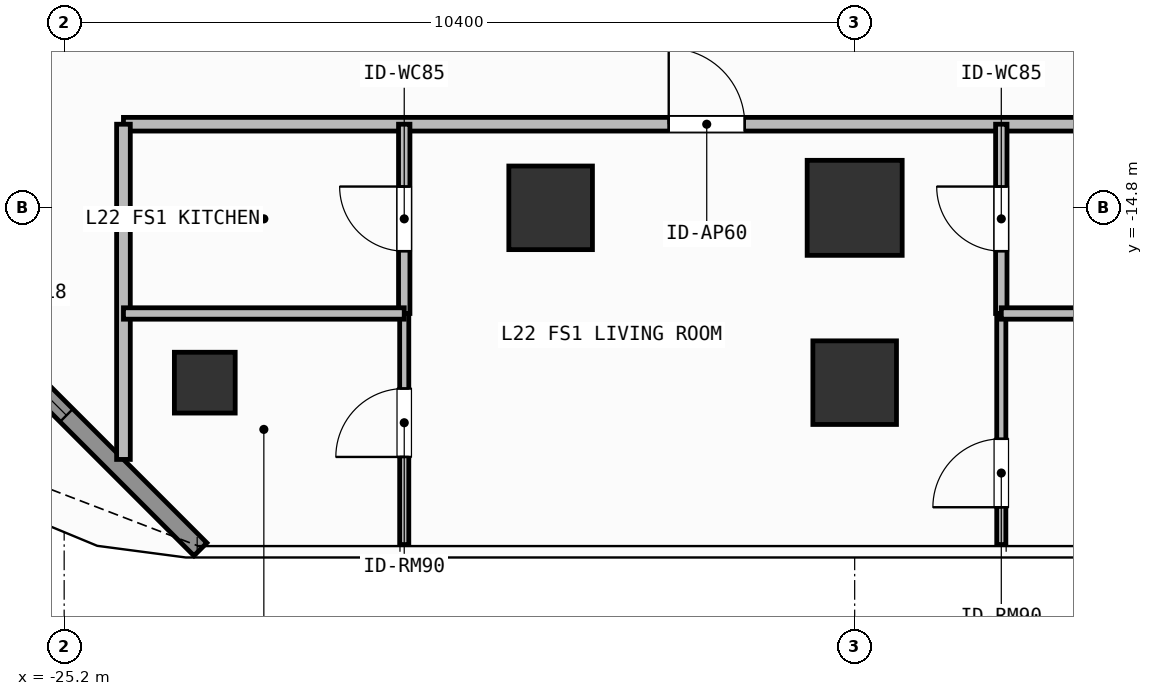
"""IFC4 building model, lengths in metres.
Left out: names, types, materials, properties, quantities, classifications, styles, units other than length and angle.
Written with IfcOpenShell. Run it as: python <this file> out.ifc"""

import sys

from ifc_helpers import new_model, si_unit, direction, frame, frame_2d, origin, origin_2d, place, context, subcontext, project, spatial, rectangle, hollow_rectangle, extrude, element, fill, save


model = new_model("IFC4")
c1 = context("Model", 3, precision=1e-05, world=origin(), true_north=direction((0.0, 1.0)))
c2 = subcontext(c1, "Body", "Model", "MODEL_VIEW")
j1 = project(units=[si_unit("LENGTHUNIT", "METRE"), si_unit("PLANEANGLEUNIT", "RADIAN")], contexts=[c1])
p1 = place(None, origin())
s1 = spatial("IfcSite", under=j1, at=p1, CompositionType="ELEMENT")
p2 = place(p1, origin())
s2 = spatial("IfcBuilding", under=s1, at=p2, CompositionType="ELEMENT")
p3 = place(p2, frame((0.0, 0.0, 89.1)))
s3 = spatial("IfcBuildingStorey", under=s2, at=p3, CompositionType="ELEMENT", Elevation=89.1)
p4 = place(p3, frame((-14.8, -14.8, 0.0), z_axis=(0.0, 0.0, 1.0), x_axis=(1.0, 0.0, 0.0)))
e1 = element("IfcColumn", 1, at=p4, inside=s3, PredefinedType="COLUMN", context=c2, shape_type="SweptSolid", body=[
    extrude(rectangle(XDim=1.25, YDim=1.25, at=origin_2d()), origin(), (0.0, 0.0, 1.0), 3.9),
])
for number, where, z_axis, x_axis in (
    (2, (-18.8, -14.8, 0.0), (0.0, 0.0, 1.0), (1.0, 0.0, 0.0)),
    (3, (-14.8, -17.1, 0.0), (0.0, 0.0, 1.0), (1.0, 0.0, 0.0)),
):
    element("IfcColumn", number, at=place(p3, frame(where, z_axis=z_axis, x_axis=x_axis)), inside=s3, PredefinedType="COLUMN", context=c2, shape_type="SweptSolid", body=[
        extrude(rectangle(XDim=1.1, YDim=1.1, at=origin_2d()), origin(), (0.0, 0.0, 1.0), 3.9),
    ])
p5 = place(p3, frame((-23.35, -17.1, 0.0), z_axis=(0.0, 0.0, 1.0), x_axis=(1.0, 0.0, 0.0)))
e4 = element("IfcColumn", 4, at=p5, inside=s3, PredefinedType="COLUMN", context=c2, shape_type="SweptSolid", body=[
    extrude(hollow_rectangle(XDim=0.8, YDim=0.8, WallThickness=0.036, at=origin_2d()), origin(), (0.0, 0.0, 1.0), 3.9),
])
p6 = place(p3, frame((-23.408, -19.292, 0.0), z_axis=(0.0, 0.0, 1.0), x_axis=(-0.707087954376, 0.707125607496, 0.0)))
e5 = element("IfcWall", 5, at=p6, inside=s3, PredefinedType="SOLIDWALL", context=c2, shape_type="SweptSolid", body=[
    extrude(rectangle(XDim=6.484, YDim=0.24, at=frame_2d((3.242, 0.0))), origin(), (0.0, 0.0, 1.0), 3.68),
])
p7 = place(p6, frame((2.492, 0.0, 0.8)))
e6 = element("IfcOpeningElement", 6, at=p7, cuts=e5, PredefinedType="OPENING", context=c2, shape_type="SweptSolid", body=[
    extrude(rectangle(XDim=1.5, YDim=1.85, at=frame_2d((0.75, 0.925))), frame((0.0, 0.13, 0.0), z_axis=(0.0, -1.0, 0.0), x_axis=(1.0, 0.0, 0.0)), (0.0, 0.0, 1.0), 0.26),
])
p8 = place(p3, frame((-24.42, -13.7, 0.0), z_axis=(0.0, 0.0, 1.0), x_axis=(1.0, 0.0, 0.0)))
e7 = element("IfcWall", 7, at=p8, inside=s3, PredefinedType="PARTITIONING", context=c2, shape_type="SweptSolid", body=[
    extrude(rectangle(XDim=16.786, YDim=0.18, at=frame_2d((8.393, 0.0))), origin(), (0.0, 0.0, 1.0), 3.68),
])
p9 = place(p8, frame((7.174, 0.0, 0.0)))
e8 = element("IfcOpeningElement", 8, at=p9, cuts=e7, PredefinedType="OPENING", context=c2, shape_type="SweptSolid", body=[
    extrude(rectangle(XDim=1.0, YDim=2.2, at=frame_2d((0.5, 1.1))), frame((0.0, 0.1, 0.0), z_axis=(0.0, -1.0, 0.0), x_axis=(1.0, 0.0, 0.0)), (0.0, 0.0, 1.0), 0.2),
])
p10 = place(p3, frame((-20.726, -16.19, 0.0), z_axis=(0.0, 0.0, 1.0), x_axis=(0.0, 1.0, 0.0)))
e9 = element("IfcWall", 9, at=p10, inside=s3, PredefinedType="PARTITIONING", context=c2, shape_type="SweptSolid", body=[
    extrude(rectangle(XDim=2.49, YDim=0.15, at=frame_2d((1.245, 0.0))), origin(), (0.0, 0.0, 1.0), 3.68),
])
p11 = place(p10, frame((0.82, 0.0, 0.0)))
e10 = element("IfcOpeningElement", 10, at=p11, cuts=e9, PredefinedType="OPENING", context=c2, shape_type="SweptSolid", body=[
    extrude(rectangle(XDim=0.85, YDim=2.1, at=frame_2d((0.425, 1.05))), frame((0.0, 0.085, 0.0), z_axis=(0.0, -1.0, 0.0), x_axis=(1.0, 0.0, 0.0)), (0.0, 0.0, 1.0), 0.17),
])
p12 = place(p3, frame((-20.726, -19.23, 0.0), z_axis=(0.0, 0.0, 1.0), x_axis=(0.0, 1.0, 0.0)))
e11 = element("IfcWall", 11, at=p12, inside=s3, PredefinedType="PARTITIONING", context=c2, shape_type="SweptSolid", body=[
    extrude(rectangle(XDim=3.04, YDim=0.12, at=frame_2d((1.52, 0.0))), origin(), (0.0, 0.0, 1.0), 3.68),
])
p13 = place(p12, frame((1.153, 0.0, 0.0)))
e12 = element("IfcOpeningElement", 12, at=p13, cuts=e11, PredefinedType="OPENING", context=c2, shape_type="SweptSolid", body=[
    extrude(rectangle(XDim=0.9, YDim=2.1, at=frame_2d((0.45, 1.05))), frame((0.0, 0.07, 0.0), z_axis=(0.0, -1.0, 0.0), x_axis=(1.0, 0.0, 0.0)), (0.0, 0.0, 1.0), 0.14),
])
p14 = place(p3, frame((-12.871, -16.19, 0.0), z_axis=(0.0, 0.0, 1.0), x_axis=(0.0, 1.0, 0.0)))
e13 = element("IfcWall", 13, at=p14, inside=s3, PredefinedType="PARTITIONING", context=c2, shape_type="SweptSolid", body=[
    extrude(rectangle(XDim=2.49, YDim=0.15, at=frame_2d((1.245, 0.0))), origin(), (0.0, 0.0, 1.0), 3.68),
])
p15 = place(p14, frame((0.82, 0.0, 0.0)))
e14 = element("IfcOpeningElement", 14, at=p15, cuts=e13, PredefinedType="OPENING", context=c2, shape_type="SweptSolid", body=[
    extrude(rectangle(XDim=0.85, YDim=2.1, at=frame_2d((0.425, 1.05))), frame((0.0, 0.085, 0.0), z_axis=(0.0, -1.0, 0.0), x_axis=(1.0, 0.0, 0.0)), (0.0, 0.0, 1.0), 0.17),
])
p16 = place(p3, frame((-12.871, -19.23, 0.0), z_axis=(0.0, 0.0, 1.0), x_axis=(0.0, 1.0, 0.0)))
e15 = element("IfcWall", 15, at=p16, inside=s3, PredefinedType="PARTITIONING", context=c2, shape_type="SweptSolid", body=[
    extrude(rectangle(XDim=3.04, YDim=0.12, at=frame_2d((1.52, 0.0))), origin(), (0.0, 0.0, 1.0), 3.68),
])
p17 = place(p16, frame((0.491, 0.0, 0.0)))
e16 = element("IfcOpeningElement", 16, at=p17, cuts=e15, PredefinedType="OPENING", context=c2, shape_type="SweptSolid", body=[
    extrude(rectangle(XDim=0.9, YDim=2.1, at=frame_2d((0.45, 1.05))), frame((0.0, 0.07, 0.0), z_axis=(0.0, -1.0, 0.0), x_axis=(1.0, 0.0, 0.0)), (0.0, 0.0, 1.0), 0.14),
])
p18 = place(p3, frame((-24.42, -18.11, 0.0), z_axis=(0.0, 0.0, 1.0), x_axis=(0.0, 1.0, 0.0)))
e17 = element("IfcWall", 17, at=p18, inside=s3, PredefinedType="PARTITIONING", context=c2, shape_type="SweptSolid", body=[
    extrude(rectangle(XDim=4.41, YDim=0.18, at=frame_2d((2.205, 0.0))), origin(), (0.0, 0.0, 1.0), 3.68),
])
p19 = place(p3, frame((-24.42, -16.19, 0.0), z_axis=(0.0, 0.0, 1.0), x_axis=(1.0, 0.0, 0.0)))
e18 = element("IfcWall", 18, at=p19, inside=s3, PredefinedType="PARTITIONING", context=c2, shape_type="SweptSolid", body=[
    extrude(rectangle(XDim=3.694, YDim=0.15, at=frame_2d((1.847, 0.0))), origin(), (0.0, 0.0, 1.0), 3.68),
])
p20 = place(p3, frame((-12.871, -16.19, 0.0), z_axis=(0.0, 0.0, 1.0), x_axis=(1.0, 0.0, 0.0)))
e19 = element("IfcWall", 19, at=p20, inside=s3, PredefinedType="PARTITIONING", context=c2, shape_type="SweptSolid", body=[
    extrude(rectangle(XDim=5.237, YDim=0.15, at=frame_2d((2.619, 0.0))), origin(), (0.0, 0.0, 1.0), 3.68),
])
p21 = place(p7, origin())
e20 = element("IfcWindow", 20, at=p21, inside=s3, PartitioningType="SINGLE_PANEL", PredefinedType="WINDOW", context=c2, shape_type="SweptSolid", body=[
    extrude(rectangle(XDim=1.5, YDim=1.85, at=frame_2d((0.75, 0.925))), frame((0.0, 0.03, 0.0), z_axis=(0.0, -1.0, 0.0), x_axis=(1.0, 0.0, 0.0)), (0.0, 0.0, 1.0), 0.06),
])
fill(e6, e20)
p22 = place(p9, origin())
e21 = element("IfcDoor", 21, at=p22, inside=s3, OperationType="SINGLE_SWING_LEFT", PredefinedType="DOOR", context=c2, shape_type="SweptSolid", body=[
    extrude(rectangle(XDim=1.0, YDim=2.2, at=frame_2d((0.5, 1.1))), frame((0.0, 0.025, 0.0), z_axis=(0.0, -1.0, 0.0), x_axis=(1.0, 0.0, 0.0)), (0.0, 0.0, 1.0), 0.05),
])
fill(e8, e21)
p23 = place(p11, origin())
e22 = element("IfcDoor", 22, at=p23, inside=s3, OperationType="SINGLE_SWING_RIGHT", PredefinedType="DOOR", context=c2, shape_type="SweptSolid", body=[
    extrude(rectangle(XDim=0.85, YDim=2.1, at=frame_2d((0.425, 1.05))), frame((0.0, 0.025, 0.0), z_axis=(0.0, -1.0, 0.0), x_axis=(1.0, 0.0, 0.0)), (0.0, 0.0, 1.0), 0.05),
])
fill(e10, e22)
p24 = place(p13, origin())
e23 = element("IfcDoor", 23, at=p24, inside=s3, OperationType="SINGLE_SWING_LEFT", PredefinedType="DOOR", context=c2, shape_type="SweptSolid", body=[
    extrude(rectangle(XDim=0.9, YDim=2.1, at=frame_2d((0.45, 1.05))), frame((0.0, 0.025, 0.0), z_axis=(0.0, -1.0, 0.0), x_axis=(1.0, 0.0, 0.0)), (0.0, 0.0, 1.0), 0.05),
])
fill(e12, e23)
p25 = place(p15, origin())
e24 = element("IfcDoor", 24, at=p25, inside=s3, OperationType="SINGLE_SWING_RIGHT", PredefinedType="DOOR", context=c2, shape_type="SweptSolid", body=[
    extrude(rectangle(XDim=0.85, YDim=2.1, at=frame_2d((0.425, 1.05))), frame((0.0, 0.025, 0.0), z_axis=(0.0, -1.0, 0.0), x_axis=(1.0, 0.0, 0.0)), (0.0, 0.0, 1.0), 0.05),
])
fill(e14, e24)
p26 = place(p17, origin())
e25 = element("IfcDoor", 25, at=p26, inside=s3, OperationType="SINGLE_SWING_LEFT", PredefinedType="DOOR", context=c2, shape_type="SweptSolid", body=[
    extrude(rectangle(XDim=0.9, YDim=2.1, at=frame_2d((0.45, 1.05))), frame((0.0, 0.025, 0.0), z_axis=(0.0, -1.0, 0.0), x_axis=(1.0, 0.0, 0.0)), (0.0, 0.0, 1.0), 0.05),
])
fill(e16, e25)
save(model, sys.argv[1])
